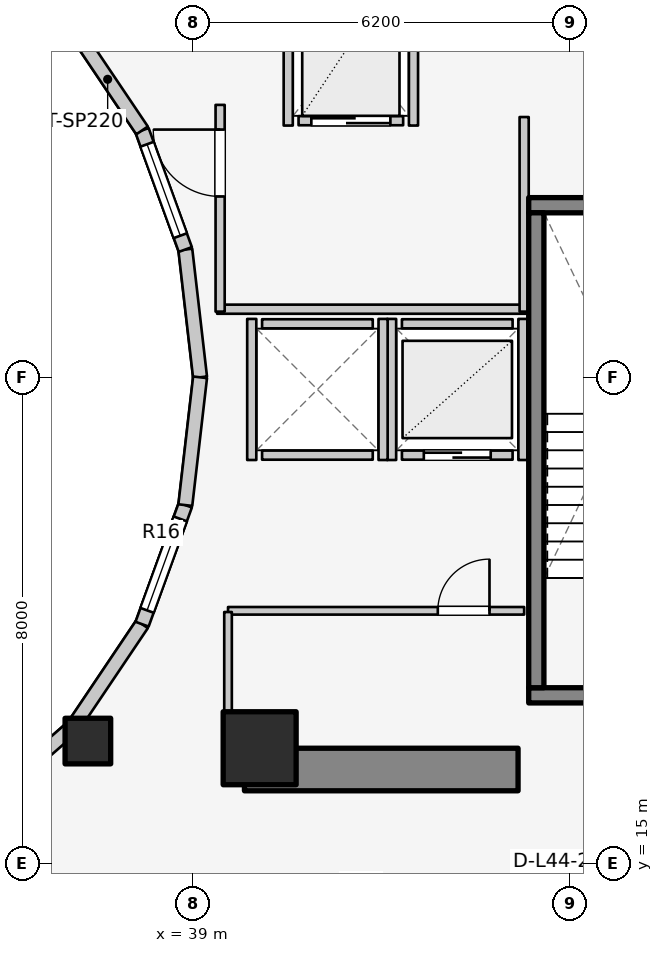
"""IFC4 building model, lengths in metres.
Left out: names, types, materials, properties, quantities, classifications, styles, units other than length and angle.
Written with IfcOpenShell. Run it as: python <this file> out.ifc"""

import sys

from ifc_helpers import new_model, si_unit, direction, frame, frame_2d, origin, origin_2d, place, context, subcontext, project, spatial, rectangle, extrude, element, fill, save


model = new_model("IFC4")
c1 = context("Model", 3, precision=1e-05, world=origin(), true_north=direction((0.0, 1.0)))
c2 = subcontext(c1, "Body", "Model", "MODEL_VIEW")
j1 = project(units=[si_unit("LENGTHUNIT", "METRE"), si_unit("PLANEANGLEUNIT", "RADIAN")], contexts=[c1])
p1 = place(None, origin())
s1 = spatial("IfcSite", under=j1, at=p1, CompositionType="ELEMENT")
p2 = place(p1, origin())
s2 = spatial("IfcBuilding", under=s1, at=p2, CompositionType="ELEMENT")
p3 = place(p2, frame((0.0, 0.0, 146.7)))
s3 = spatial("IfcBuildingStorey", under=s2, at=p3, CompositionType="ELEMENT", Elevation=146.7)
p4 = place(p3, frame((39.85, 16.55, 0.0), z_axis=(0.0, 0.0, 1.0), x_axis=(1.0, 0.0, 0.0)))
e1 = element("IfcWall", 1, at=p4, inside=s3, PredefinedType="SHEAR", context=c2, shape_type="SweptSolid", body=[
    extrude(rectangle(XDim=4.5, YDim=0.7, at=frame_2d((2.25, 0.0))), origin(), (0.0, 0.0, 1.0), 3.1),
])
p5 = place(p3, frame((44.525, 17.77, 0.0), z_axis=(0.0, 0.0, 1.0), x_axis=(1.0, 0.0, 0.0)))
e2 = element("IfcWall", 2, at=p5, inside=s3, PredefinedType="SOLIDWALL", context=c2, shape_type="SweptSolid", body=[
    extrude(rectangle(XDim=3.37, YDim=0.25, at=frame_2d((1.685, 0.0))), origin(), (0.0, 0.0, 1.0), 3.1),
])
p6 = place(p5, frame((1.135, 0.0, 0.0)))
e3 = element("IfcOpeningElement", 3, at=p6, cuts=e2, PredefinedType="OPENING", context=c2, shape_type="SweptSolid", body=[
    extrude(rectangle(XDim=1.1, YDim=2.1, at=frame_2d((0.55, 1.05))), frame((0.0, 0.135, 0.0), z_axis=(0.0, -1.0, 0.0), x_axis=(1.0, 0.0, 0.0)), (0.0, 0.0, 1.0), 0.27),
])
p7 = place(p3, frame((44.525, 25.83, 0.0), z_axis=(0.0, 0.0, 1.0), x_axis=(1.0, 0.0, 0.0)))
e4 = element("IfcWall", 4, at=p7, inside=s3, PredefinedType="SOLIDWALL", context=c2, shape_type="SweptSolid", body=[
    extrude(rectangle(XDim=3.37, YDim=0.25, at=frame_2d((1.685, 0.0))), origin(), (0.0, 0.0, 1.0), 3.1),
])
p8 = place(p3, frame((44.65, 17.895, 0.0), z_axis=(0.0, 0.0, 1.0), x_axis=(0.0, 1.0, 0.0)))
e5 = element("IfcWall", 5, at=p8, inside=s3, PredefinedType="SOLIDWALL", context=c2, shape_type="SweptSolid", body=[
    extrude(rectangle(XDim=7.81, YDim=0.25, at=frame_2d((3.905, 0.0))), origin(), (0.0, 0.0, 1.0), 3.1),
])
p9 = place(p3, frame((40.1, 16.9, 0.0), z_axis=(0.0, 0.0, 1.0), x_axis=(1.0, 0.0, 0.0)))
e6 = element("IfcColumn", 6, at=p9, inside=s3, PredefinedType="COLUMN", context=c2, shape_type="SweptSolid", body=[
    extrude(rectangle(XDim=1.2, YDim=1.2, at=origin_2d()), origin(), (0.0, 0.0, 1.0), 3.1),
])
p10 = place(p3, frame((37.275, 17.018, 0.0), z_axis=(0.0, 0.0, 1.0), x_axis=(1.0, 0.0, 0.0)))
e7 = element("IfcColumn", 7, at=p10, inside=s3, PredefinedType="COLUMN", context=c2, shape_type="SweptSolid", body=[
    extrude(rectangle(XDim=0.75, YDim=0.75, at=origin_2d()), origin(), (0.0, 0.0, 1.0), 3.1),
])
p11 = place(p3, frame((39.12, 23.0, 0.0), z_axis=(0.0, 0.0, 1.0), x_axis=(-0.114711713601, 0.993398823617, 0.0)))
e8 = element("IfcWall", 8, at=p11, inside=s3, PredefinedType="STANDARD", context=c2, shape_type="SweptSolid", body=[
    extrude(rectangle(XDim=2.115, YDim=0.23, at=frame_2d((1.058, 0.0))), origin(), (0.0, 0.0, 1.0), 2.84),
])
p12 = place(p3, frame((38.877, 25.102, 0.0), z_axis=(0.0, 0.0, 1.0), x_axis=(-0.341423187295, 0.93990968033, 0.0)))
e9 = element("IfcWall", 9, at=p12, inside=s3, PredefinedType="STANDARD", context=c2, shape_type="SweptSolid", body=[
    extrude(rectangle(XDim=2.084, YDim=0.23, at=frame_2d((1.042, 0.0))), origin(), (0.0, 0.0, 1.0), 2.84),
])
p13 = place(p12, frame((0.242, 0.0, 0.85)))
e10 = element("IfcOpeningElement", 10, at=p13, cuts=e9, PredefinedType="OPENING", context=c2, shape_type="SweptSolid", body=[
    extrude(rectangle(XDim=1.6, YDim=1.65, at=frame_2d((0.8, 0.825))), frame((0.0, 0.125, 0.0), z_axis=(0.0, -1.0, 0.0), x_axis=(1.0, 0.0, 0.0)), (0.0, 0.0, 1.0), 0.25),
])
p14 = place(p3, frame((38.166, 27.06, 0.0), z_axis=(0.0, 0.0, 1.0), x_axis=(-0.558197800898, 0.829707909492, 0.0)))
e11 = element("IfcWall", 11, at=p14, inside=s3, PredefinedType="STANDARD", context=c2, shape_type="SweptSolid", body=[
    extrude(rectangle(XDim=2.027, YDim=0.23, at=frame_2d((1.013, 0.0))), origin(), (0.0, 0.0, 1.0), 2.16),
])
p15 = place(p3, frame((35.56, 15.968, 0.0), z_axis=(0.0, 0.0, 1.0), x_axis=(0.752576694707, 0.658504607869, 0.0)))
e12 = element("IfcWall", 12, at=p15, inside=s3, PredefinedType="STANDARD", context=c2, shape_type="SweptSolid", body=[
    extrude(rectangle(XDim=1.959, YDim=0.23, at=frame_2d((0.98, 0.0))), origin(), (0.0, 0.0, 1.0), 2.16),
])
p16 = place(p3, frame((37.035, 17.258, 0.0), z_axis=(0.0, 0.0, 1.0), x_axis=(0.558197800898, 0.829707909492, 0.0)))
e13 = element("IfcWall", 13, at=p16, inside=s3, PredefinedType="STANDARD", context=c2, shape_type="SweptSolid", body=[
    extrude(rectangle(XDim=2.027, YDim=0.23, at=frame_2d((1.013, 0.0))), origin(), (0.0, 0.0, 1.0), 2.16),
])
p17 = place(p3, frame((38.166, 18.94, 0.0), z_axis=(0.0, 0.0, 1.0), x_axis=(0.341423187295, 0.93990968033, 0.0)))
e14 = element("IfcWall", 14, at=p17, inside=s3, PredefinedType="STANDARD", context=c2, shape_type="SweptSolid", body=[
    extrude(rectangle(XDim=2.084, YDim=0.23, at=frame_2d((1.042, 0.0))), origin(), (0.0, 0.0, 1.0), 2.84),
])
p18 = place(p17, frame((0.242, 0.0, 0.85)))
e15 = element("IfcOpeningElement", 15, at=p18, cuts=e14, PredefinedType="OPENING", context=c2, shape_type="SweptSolid", body=[
    extrude(rectangle(XDim=1.6, YDim=1.65, at=frame_2d((0.8, 0.825))), frame((0.0, 0.125, 0.0), z_axis=(0.0, -1.0, 0.0), x_axis=(1.0, 0.0, 0.0)), (0.0, 0.0, 1.0), 0.25),
])
p19 = place(p3, frame((38.877, 20.898, 0.0), z_axis=(0.0, 0.0, 1.0), x_axis=(0.114711713601, 0.993398823617, 0.0)))
e16 = element("IfcWall", 16, at=p19, inside=s3, PredefinedType="STANDARD", context=c2, shape_type="SweptSolid", body=[
    extrude(rectangle(XDim=2.115, YDim=0.23, at=frame_2d((1.058, 0.0))), origin(), (0.0, 0.0, 1.0), 2.84),
])
p20 = place(p3, frame((42.44, 21.72, 0.0), z_axis=(0.0, 0.0, 1.0), x_axis=(1.0, 0.0, 0.0)))
e17 = element("IfcWall", 17, at=p20, inside=s3, PredefinedType="SOLIDWALL", context=c2, shape_type="SweptSolid", body=[
    extrude(rectangle(XDim=1.82, YDim=0.15, at=frame_2d((0.91, 0.0))), origin(), (0.0, 0.0, 1.0), 2.855),
])
p21 = place(p20, frame((0.36, 0.0, 0.0)))
e18 = element("IfcOpeningElement", 18, at=p21, cuts=e17, PredefinedType="OPENING", context=c2, shape_type="SweptSolid", body=[
    extrude(rectangle(XDim=1.1, YDim=2.1, at=frame_2d((0.55, 1.05))), frame((0.0, 0.085, 0.0), z_axis=(0.0, -1.0, 0.0), x_axis=(1.0, 0.0, 0.0)), (0.0, 0.0, 1.0), 0.17),
])
p22 = place(p3, frame((42.44, 23.88, 0.0), z_axis=(0.0, 0.0, 1.0), x_axis=(1.0, 0.0, 0.0)))
e19 = element("IfcWall", 19, at=p22, inside=s3, PredefinedType="SOLIDWALL", context=c2, shape_type="SweptSolid", body=[
    extrude(rectangle(XDim=1.82, YDim=0.15, at=frame_2d((0.91, 0.0))), origin(), (0.0, 0.0, 1.0), 2.855),
])
for number, where, z_axis, x_axis in (
    (20, (42.27, 21.64, 0.0), (0.0, 0.0, 1.0), (0.0, 1.0, 0.0)),
    (21, (44.43, 21.64, 0.0), (0.0, 0.0, 1.0), (0.0, 1.0, 0.0)),
):
    element("IfcWall", number, at=place(p3, frame(where, z_axis=z_axis, x_axis=x_axis)), inside=s3, PredefinedType="SOLIDWALL", context=c2, shape_type="SweptSolid", body=[
        extrude(rectangle(XDim=2.32, YDim=0.15, at=frame_2d((1.16, 0.0))), origin(), (0.0, 0.0, 1.0), 2.855),
    ])
for number, where, z_axis, x_axis in (
    (22, (40.14, 21.72, 0.0), (0.0, 0.0, 1.0), (1.0, 0.0, 0.0)),
    (23, (40.14, 23.88, 0.0), (0.0, 0.0, 1.0), (1.0, 0.0, 0.0)),
):
    element("IfcWall", number, at=place(p3, frame(where, z_axis=z_axis, x_axis=x_axis)), inside=s3, PredefinedType="SOLIDWALL", context=c2, shape_type="SweptSolid", body=[
        extrude(rectangle(XDim=1.82, YDim=0.15, at=frame_2d((0.91, 0.0))), origin(), (0.0, 0.0, 1.0), 2.12),
    ])
p23 = place(p3, frame((39.97, 21.64, 0.0), z_axis=(0.0, 0.0, 1.0), x_axis=(0.0, 1.0, 0.0)))
e24 = element("IfcWall", 24, at=p23, inside=s3, PredefinedType="SOLIDWALL", context=c2, shape_type="SweptSolid", body=[
    extrude(rectangle(XDim=2.32, YDim=0.15, at=frame_2d((1.16, 0.0))), origin(), (0.0, 0.0, 1.0), 2.12),
])
p24 = place(p3, frame((42.13, 21.64, 0.0), z_axis=(0.0, 0.0, 1.0), x_axis=(0.0, 1.0, 0.0)))
e25 = element("IfcWall", 25, at=p24, inside=s3, PredefinedType="SOLIDWALL", context=c2, shape_type="SweptSolid", body=[
    extrude(rectangle(XDim=2.32, YDim=0.15, at=frame_2d((1.16, 0.0))), origin(), (0.0, 0.0, 1.0), 2.855),
])
p25 = place(p3, frame((40.74, 27.22, 0.0), z_axis=(0.0, 0.0, 1.0), x_axis=(1.0, 0.0, 0.0)))
e26 = element("IfcWall", 26, at=p25, inside=s3, PredefinedType="SOLIDWALL", context=c2, shape_type="SweptSolid", body=[
    extrude(rectangle(XDim=1.72, YDim=0.15, at=frame_2d((0.86, 0.0))), origin(), (0.0, 0.0, 1.0), 2.855),
])
p26 = place(p25, frame((0.21, 0.0, 0.0)))
e27 = element("IfcOpeningElement", 27, at=p26, cuts=e26, PredefinedType="OPENING", context=c2, shape_type="SweptSolid", body=[
    extrude(rectangle(XDim=1.3, YDim=2.1, at=frame_2d((0.65, 1.05))), frame((0.0, 0.085, 0.0), z_axis=(0.0, -1.0, 0.0), x_axis=(1.0, 0.0, 0.0)), (0.0, 0.0, 1.0), 0.17),
])
for number, where, z_axis, x_axis in (
    (28, (40.57, 27.14, 0.0), (0.0, 0.0, 1.0), (0.0, 1.0, 0.0)),
    (29, (42.63, 27.14, 0.0), (0.0, 0.0, 1.0), (0.0, 1.0, 0.0)),
):
    element("IfcWall", number, at=place(p3, frame(where, z_axis=z_axis, x_axis=x_axis)), inside=s3, PredefinedType="SOLIDWALL", context=c2, shape_type="SweptSolid", body=[
        extrude(rectangle(XDim=2.72, YDim=0.15, at=frame_2d((1.36, 0.0))), origin(), (0.0, 0.0, 1.0), 2.855),
    ])
p27 = place(p3, frame((39.4, 24.12, 0.0), z_axis=(0.0, 0.0, 1.0), x_axis=(1.0, 0.0, 0.0)))
e30 = element("IfcWall", 30, at=p27, inside=s3, PredefinedType="PARTITIONING", context=c2, shape_type="SweptSolid", body=[
    extrude(rectangle(XDim=5.08, YDim=0.15, at=frame_2d((2.54, 0.0))), origin(), (0.0, 0.0, 1.0), 2.12),
])
p28 = place(p3, frame((44.45, 24.08, 0.0), z_axis=(0.0, 0.0, 1.0), x_axis=(0.0, 1.0, 0.0)))
e31 = element("IfcWall", 31, at=p28, inside=s3, PredefinedType="PARTITIONING", context=c2, shape_type="SweptSolid", body=[
    extrude(rectangle(XDim=3.2, YDim=0.15, at=frame_2d((1.6, 0.0))), origin(), (0.0, 0.0, 1.0), 2.855),
])
p29 = place(p3, frame((39.45, 24.08, 0.0), z_axis=(0.0, 0.0, 1.0), x_axis=(0.0, 1.0, 0.0)))
e32 = element("IfcWall", 32, at=p29, inside=s3, PredefinedType="PARTITIONING", context=c2, shape_type="SweptSolid", body=[
    extrude(rectangle(XDim=3.4, YDim=0.15, at=frame_2d((1.7, 0.0))), origin(), (0.0, 0.0, 1.0), 2.855),
])
p30 = place(p29, frame((1.894, 0.0, 0.0)))
e33 = element("IfcOpeningElement", 33, at=p30, cuts=e32, PredefinedType="OPENING", context=c2, shape_type="SweptSolid", body=[
    extrude(rectangle(XDim=1.1, YDim=2.1, at=frame_2d((0.55, 1.05))), frame((0.0, 0.085, 0.0), z_axis=(0.0, -1.0, 0.0), x_axis=(1.0, 0.0, 0.0)), (0.0, 0.0, 1.0), 0.17),
])
p31 = place(p3, frame((39.58, 19.16, 0.0), z_axis=(0.0, 0.0, 1.0), x_axis=(1.0, 0.0, 0.0)))
e34 = element("IfcWall", 34, at=p31, inside=s3, PredefinedType="PARTITIONING", context=c2, shape_type="SweptSolid", body=[
    extrude(rectangle(XDim=4.87, YDim=0.125, at=frame_2d((2.435, 0.0))), origin(), (0.0, 0.0, 1.0), 2.12),
])
p32 = place(p31, frame((3.45, 0.0, 0.0)))
e35 = element("IfcOpeningElement", 35, at=p32, cuts=e34, PredefinedType="OPENING", context=c2, shape_type="SweptSolid", body=[
    extrude(rectangle(XDim=0.85, YDim=2.05, at=frame_2d((0.425, 1.025))), frame((0.0, 0.073, 0.0), z_axis=(0.0, -1.0, 0.0), x_axis=(1.0, 0.0, 0.0)), (0.0, 0.0, 1.0), 0.145),
])
p33 = place(p3, frame((39.58, 17.1, 0.0), z_axis=(0.0, 0.0, 1.0), x_axis=(0.0, 1.0, 0.0)))
e36 = element("IfcWall", 36, at=p33, inside=s3, PredefinedType="PARTITIONING", context=c2, shape_type="SweptSolid", body=[
    extrude(rectangle(XDim=2.04, YDim=0.125, at=frame_2d((1.02, 0.0))), origin(), (0.0, 0.0, 1.0), 2.232),
])
p34 = place(p3, frame((35.55, 15.985, 0.0), z_axis=(0.0, 0.0, 1.0), x_axis=(0.524565340045, -0.851370192116, 0.0)))
e37 = element("IfcWall", 37, at=p34, inside=s3, PredefinedType="PARTITIONING", context=c2, shape_type="SweptSolid", body=[
    extrude(rectangle(XDim=3.027, YDim=0.125, at=frame_2d((1.514, 0.0))), origin(), (0.0, 0.0, 1.0), 2.299),
])
p35 = place(p13, origin())
e38 = element("IfcWindow", 38, at=p35, inside=s3, PartitioningType="SINGLE_PANEL", PredefinedType="WINDOW", context=c2, shape_type="SweptSolid", body=[
    extrude(rectangle(XDim=1.6, YDim=1.65, at=frame_2d((0.8, 0.825))), frame((0.0, 0.03, 0.0), z_axis=(0.0, -1.0, 0.0), x_axis=(1.0, 0.0, 0.0)), (0.0, 0.0, 1.0), 0.06),
])
fill(e10, e38)
p36 = place(p18, origin())
e39 = element("IfcWindow", 39, at=p36, inside=s3, PartitioningType="SINGLE_PANEL", PredefinedType="WINDOW", context=c2, shape_type="SweptSolid", body=[
    extrude(rectangle(XDim=1.6, YDim=1.65, at=frame_2d((0.8, 0.825))), frame((0.0, 0.03, 0.0), z_axis=(0.0, -1.0, 0.0), x_axis=(1.0, 0.0, 0.0)), (0.0, 0.0, 1.0), 0.06),
])
fill(e15, e39)
p37 = place(p21, origin())
e40 = element("IfcDoor", 40, at=p37, inside=s3, OperationType="DOUBLE_DOOR_SLIDING", PredefinedType="DOOR", context=c2, shape_type="SweptSolid", body=[
    extrude(rectangle(XDim=1.1, YDim=2.1, at=frame_2d((0.55, 1.05))), frame((0.0, 0.025, 0.0), z_axis=(0.0, -1.0, 0.0), x_axis=(1.0, 0.0, 0.0)), (0.0, 0.0, 1.0), 0.05),
])
fill(e18, e40)
p38 = place(p26, origin())
e41 = element("IfcDoor", 41, at=p38, inside=s3, OperationType="DOUBLE_DOOR_SLIDING", PredefinedType="DOOR", context=c2, shape_type="SweptSolid", body=[
    extrude(rectangle(XDim=1.3, YDim=2.1, at=frame_2d((0.65, 1.05))), frame((0.0, 0.025, 0.0), z_axis=(0.0, -1.0, 0.0), x_axis=(1.0, 0.0, 0.0)), (0.0, 0.0, 1.0), 0.05),
])
fill(e27, e41)
p39 = place(p30, origin())
e42 = element("IfcDoor", 42, at=p39, inside=s3, OperationType="SINGLE_SWING_RIGHT", PredefinedType="DOOR", context=c2, shape_type="SweptSolid", body=[
    extrude(rectangle(XDim=1.1, YDim=2.1, at=frame_2d((0.55, 1.05))), frame((0.0, 0.025, 0.0), z_axis=(0.0, -1.0, 0.0), x_axis=(1.0, 0.0, 0.0)), (0.0, 0.0, 1.0), 0.05),
])
fill(e33, e42)
p40 = place(p32, origin())
e43 = element("IfcDoor", 43, at=p40, inside=s3, OperationType="SINGLE_SWING_RIGHT", PredefinedType="DOOR", context=c2, shape_type="SweptSolid", body=[
    extrude(rectangle(XDim=0.85, YDim=2.05, at=frame_2d((0.425, 1.025))), frame((0.0, 0.025, 0.0), z_axis=(0.0, -1.0, 0.0), x_axis=(1.0, 0.0, 0.0)), (0.0, 0.0, 1.0), 0.05),
])
fill(e35, e43)
save(model, sys.argv[1])
